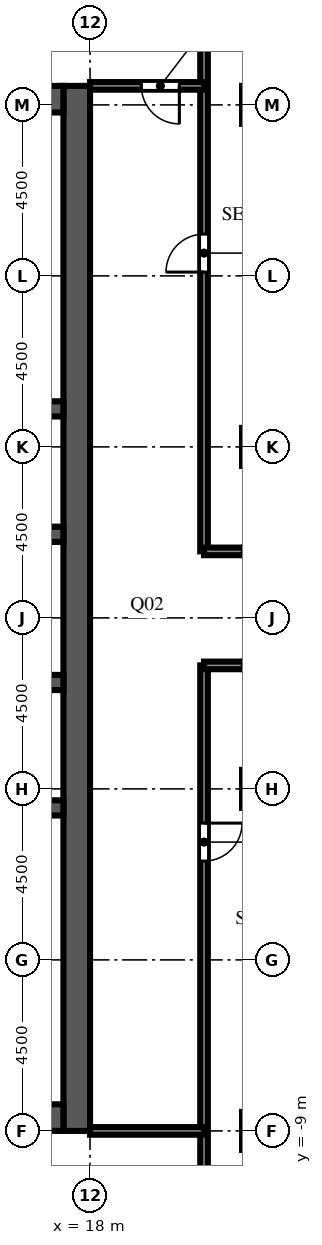
"""IFC4 building model, lengths in metres.
Left out: names, types, materials, properties, quantities, classifications, styles, units other than length and angle.
Written with IfcOpenShell. Run it as: python <this file> out.ifc"""

import sys

from ifc_helpers import new_model, si_unit, direction, frame, frame_2d, origin, place, context, subcontext, project, spatial, rectangle, extrude, element, fill, save


model = new_model("IFC4")
c1 = context("Model", 3, precision=1e-05, world=origin(), true_north=direction((0.0, 1.0)))
c2 = subcontext(c1, "Body", "Model", "MODEL_VIEW")
j1 = project(units=[si_unit("LENGTHUNIT", "METRE"), si_unit("PLANEANGLEUNIT", "RADIAN")], contexts=[c1])
p1 = place(None, origin())
s1 = spatial("IfcSite", under=j1, at=p1, CompositionType="ELEMENT")
p2 = place(p1, origin())
s2 = spatial("IfcBuilding", under=s1, at=p2, CompositionType="ELEMENT")
p3 = place(p2, frame((0.0, 0.0, 260.3)))
s3 = spatial("IfcBuildingStorey", under=s2, at=p3, CompositionType="ELEMENT", Elevation=260.3)
p4 = place(p3, frame((17.65, -9.0, 0.0), z_axis=(0.0, 0.0, 1.0), x_axis=(0.0, 1.0, 0.0)))
e1 = element("IfcWall", 1, at=p4, inside=s3, PredefinedType="SHEAR", context=c2, shape_type="SweptSolid", body=[
    extrude(rectangle(XDim=27.5, YDim=0.7, at=frame_2d((13.75, 0.0))), origin(), (0.0, 0.0, 1.0), 6.0),
])
p5 = place(p4, frame((12.55, 0.0, 0.0)))
e2 = element("IfcOpeningElement", 2, at=p5, cuts=e1, PredefinedType="OPENING", context=c2, shape_type="SweptSolid", body=[
    extrude(rectangle(XDim=2.4, YDim=2.4, at=frame_2d((1.2, 1.2))), frame((0.0, 0.36, 0.0), z_axis=(0.0, -1.0, 0.0), x_axis=(1.0, 0.0, 0.0)), (0.0, 0.0, 1.0), 0.72),
])
p6 = place(p4, frame((6.825, 0.0, 0.0)))
e3 = element("IfcOpeningElement", 3, at=p6, cuts=e1, PredefinedType="OPENING", context=c2, shape_type="SweptSolid", body=[
    extrude(rectangle(XDim=1.2, YDim=2.1, at=frame_2d((0.6, 1.05))), frame((0.0, 0.36, 0.0), z_axis=(0.0, -1.0, 0.0), x_axis=(1.0, 0.0, 0.0)), (0.0, 0.0, 1.0), 0.72),
])
p7 = place(p4, frame((19.475, 0.0, 0.0)))
e4 = element("IfcOpeningElement", 4, at=p7, cuts=e1, PredefinedType="OPENING", context=c2, shape_type="SweptSolid", body=[
    extrude(rectangle(XDim=1.2, YDim=2.1, at=frame_2d((0.6, 1.05))), frame((0.0, 0.36, 0.0), z_axis=(0.0, -1.0, 0.0), x_axis=(1.0, 0.0, 0.0)), (0.0, 0.0, 1.0), 0.72),
])
for number, where, z_axis, x_axis in (
    (5, (6.7, -8.65, 0.0), (0.0, 0.0, 1.0), (1.0, 0.0, 0.0)),
    (6, (6.7, 18.15, 0.0), (0.0, 0.0, 1.0), (1.0, 0.0, 0.0)),
):
    element("IfcWall", number, at=place(p3, frame(where, z_axis=z_axis, x_axis=x_axis)), inside=s3, PredefinedType="SHEAR", context=c2, shape_type="SweptSolid", body=[
        extrude(rectangle(XDim=10.6, YDim=0.7, at=frame_2d((5.3, 0.0))), origin(), (0.0, 0.0, 1.0), 6.0),
    ])
p8 = place(p3, frame((6.7, -0.5, 0.0), z_axis=(0.0, 0.0, 1.0), x_axis=(1.0, 0.0, 0.0)))
e7 = element("IfcWall", 7, at=p8, inside=s3, PredefinedType="SHEAR", context=c2, shape_type="SweptSolid", body=[
    extrude(rectangle(XDim=10.6, YDim=0.4, at=frame_2d((5.3, 0.0))), origin(), (0.0, 0.0, 1.0), 6.0),
])
p9 = place(p3, frame((6.7, 2.8, 0.0), z_axis=(0.0, 0.0, 1.0), x_axis=(1.0, 0.0, 0.0)))
e8 = element("IfcWall", 8, at=p9, inside=s3, PredefinedType="SHEAR", context=c2, shape_type="SweptSolid", body=[
    extrude(rectangle(XDim=10.6, YDim=0.4, at=frame_2d((5.3, 0.0))), origin(), (0.0, 0.0, 1.0), 6.0),
])
p10 = place(p9, frame((0.688, 0.0, 0.0)))
e9 = element("IfcOpeningElement", 9, at=p10, cuts=e8, PredefinedType="OPENING", context=c2, shape_type="SweptSolid", body=[
    extrude(rectangle(XDim=1.1, YDim=2.1, at=frame_2d((0.55, 1.05))), frame((0.0, 0.21, 0.0), z_axis=(0.0, -1.0, 0.0), x_axis=(1.0, 0.0, 0.0)), (0.0, 0.0, 1.0), 0.42),
])
p11 = place(p9, frame((3.438, 0.0, 0.0)))
e10 = element("IfcOpeningElement", 10, at=p11, cuts=e8, PredefinedType="OPENING", context=c2, shape_type="SweptSolid", body=[
    extrude(rectangle(XDim=1.1, YDim=2.1, at=frame_2d((0.55, 1.05))), frame((0.0, 0.21, 0.0), z_axis=(0.0, -1.0, 0.0), x_axis=(1.0, 0.0, 0.0)), (0.0, 0.0, 1.0), 0.42),
])
p12 = place(p9, frame((6.113, 0.0, 0.0)))
e11 = element("IfcOpeningElement", 11, at=p12, cuts=e8, PredefinedType="OPENING", context=c2, shape_type="SweptSolid", body=[
    extrude(rectangle(XDim=1.0, YDim=2.1, at=frame_2d((0.5, 1.05))), frame((0.0, 0.21, 0.0), z_axis=(0.0, -1.0, 0.0), x_axis=(1.0, 0.0, 0.0)), (0.0, 0.0, 1.0), 0.42),
])
p13 = place(p9, frame((8.863, 0.0, 0.0)))
e12 = element("IfcOpeningElement", 12, at=p13, cuts=e8, PredefinedType="OPENING", context=c2, shape_type="SweptSolid", body=[
    extrude(rectangle(XDim=1.0, YDim=2.1, at=frame_2d((0.5, 1.05))), frame((0.0, 0.21, 0.0), z_axis=(0.0, -1.0, 0.0), x_axis=(1.0, 0.0, 0.0)), (0.0, 0.0, 1.0), 0.42),
])
p14 = place(p3, frame((6.7, 6.7, 0.0), z_axis=(0.0, 0.0, 1.0), x_axis=(1.0, 0.0, 0.0)))
e13 = element("IfcWall", 13, at=p14, inside=s3, PredefinedType="SHEAR", context=c2, shape_type="SweptSolid", body=[
    extrude(rectangle(XDim=10.6, YDim=0.4, at=frame_2d((5.3, 0.0))), origin(), (0.0, 0.0, 1.0), 6.0),
])
p15 = place(p14, frame((3.438, 0.0, 0.0)))
e14 = element("IfcOpeningElement", 14, at=p15, cuts=e13, PredefinedType="OPENING", context=c2, shape_type="SweptSolid", body=[
    extrude(rectangle(XDim=1.1, YDim=2.1, at=frame_2d((0.55, 1.05))), frame((0.0, 0.21, 0.0), z_axis=(0.0, -1.0, 0.0), x_axis=(1.0, 0.0, 0.0)), (0.0, 0.0, 1.0), 0.42),
])
p16 = place(p14, frame((6.062, 0.0, 0.0)))
e15 = element("IfcOpeningElement", 15, at=p16, cuts=e13, PredefinedType="OPENING", context=c2, shape_type="SweptSolid", body=[
    extrude(rectangle(XDim=1.1, YDim=2.1, at=frame_2d((0.55, 1.05))), frame((0.0, 0.21, 0.0), z_axis=(0.0, -1.0, 0.0), x_axis=(1.0, 0.0, 0.0)), (0.0, 0.0, 1.0), 0.42),
])
p17 = place(p14, frame((8.812, 0.0, 0.0)))
e16 = element("IfcOpeningElement", 16, at=p17, cuts=e13, PredefinedType="OPENING", context=c2, shape_type="SweptSolid", body=[
    extrude(rectangle(XDim=1.1, YDim=2.1, at=frame_2d((0.55, 1.05))), frame((0.0, 0.21, 0.0), z_axis=(0.0, -1.0, 0.0), x_axis=(1.0, 0.0, 0.0)), (0.0, 0.0, 1.0), 0.42),
])
p18 = place(p14, frame((0.738, 0.0, 0.0)))
e17 = element("IfcOpeningElement", 17, at=p18, cuts=e13, PredefinedType="OPENING", context=c2, shape_type="SweptSolid", body=[
    extrude(rectangle(XDim=1.0, YDim=2.1, at=frame_2d((0.5, 1.05))), frame((0.0, 0.21, 0.0), z_axis=(0.0, -1.0, 0.0), x_axis=(1.0, 0.0, 0.0)), (0.0, 0.0, 1.0), 0.42),
])
p19 = place(p3, frame((6.7, 10.0, 0.0), z_axis=(0.0, 0.0, 1.0), x_axis=(1.0, 0.0, 0.0)))
e18 = element("IfcWall", 18, at=p19, inside=s3, PredefinedType="SHEAR", context=c2, shape_type="SweptSolid", body=[
    extrude(rectangle(XDim=10.6, YDim=0.4, at=frame_2d((5.3, 0.0))), origin(), (0.0, 0.0, 1.0), 6.0),
])
p20 = place(p3, frame((21.0, 3.25, 0.0), z_axis=(0.0, 0.0, 1.0), x_axis=(0.0, -1.0, 0.0)))
e19 = element("IfcWall", 19, at=p20, inside=s3, PredefinedType="PARTITIONING", context=c2, shape_type="SweptSolid", body=[
    extrude(rectangle(XDim=20.8, YDim=0.2, at=frame_2d((10.4, 0.0))), origin(), (0.0, 0.0, 1.0), 5.55),
])
p21 = place(p20, frame((4.15, 0.0, 0.0)))
e20 = element("IfcOpeningElement", 20, at=p21, cuts=e19, PredefinedType="OPENING", context=c2, shape_type="SweptSolid", body=[
    extrude(rectangle(XDim=1.0, YDim=2.1, at=frame_2d((0.5, 1.05))), frame((0.0, 0.11, 0.0), z_axis=(0.0, -1.0, 0.0), x_axis=(1.0, 0.0, 0.0)), (0.0, 0.0, 1.0), 0.22),
])
p22 = place(p3, frame((21.0, 31.4, 0.0), z_axis=(0.0, 0.0, 1.0), x_axis=(0.0, -1.0, 0.0)))
e21 = element("IfcWall", 21, at=p22, inside=s3, PredefinedType="PARTITIONING", context=c2, shape_type="SweptSolid", body=[
    extrude(rectangle(XDim=25.15, YDim=0.2, at=frame_2d((12.575, 0.0))), origin(), (0.0, 0.0, 1.0), 5.55),
])
p23 = place(p22, frame((16.8, 0.0, 0.0)))
e22 = element("IfcOpeningElement", 22, at=p23, cuts=e21, PredefinedType="OPENING", context=c2, shape_type="SweptSolid", body=[
    extrude(rectangle(XDim=1.0, YDim=2.1, at=frame_2d((0.5, 1.05))), frame((0.0, 0.11, 0.0), z_axis=(0.0, -1.0, 0.0), x_axis=(1.0, 0.0, 0.0)), (0.0, 0.0, 1.0), 0.22),
])
p24 = place(p3, frame((18.0, -9.0, 0.0), z_axis=(0.0, 0.0, 1.0), x_axis=(1.0, 0.0, 0.0)))
e23 = element("IfcWall", 23, at=p24, inside=s3, PredefinedType="PARTITIONING", context=c2, shape_type="SweptSolid", body=[
    extrude(rectangle(XDim=3.0, YDim=0.2, at=frame_2d((1.5, 0.0))), origin(), (0.0, 0.0, 1.0), 5.55),
])
for number, where, z_axis, x_axis in (
    (24, (21.0, 3.25, 0.0), (0.0, 0.0, 1.0), (1.0, 0.0, 0.0)),
    (25, (21.0, 6.25, 0.0), (0.0, 0.0, 1.0), (1.0, 0.0, 0.0)),
):
    element("IfcWall", number, at=place(p3, frame(where, z_axis=z_axis, x_axis=x_axis)), inside=s3, PredefinedType="PARTITIONING", context=c2, shape_type="SweptSolid", body=[
        extrude(rectangle(XDim=1.05, YDim=0.2, at=frame_2d((0.525, 0.0))), origin(), (0.0, 0.0, 1.0), 5.55),
    ])
p25 = place(p3, frame((18.0, 18.5, 0.0), z_axis=(0.0, 0.0, 1.0), x_axis=(1.0, 0.0, 0.0)))
e26 = element("IfcWall", 26, at=p25, inside=s3, PredefinedType="PARTITIONING", context=c2, shape_type="SweptSolid", body=[
    extrude(rectangle(XDim=3.0, YDim=0.2, at=frame_2d((1.5, 0.0))), origin(), (0.0, 0.0, 1.0), 5.55),
])
p26 = place(p25, frame((1.35, 0.0, 0.0)))
e27 = element("IfcOpeningElement", 27, at=p26, cuts=e26, PredefinedType="OPENING", context=c2, shape_type="SweptSolid", body=[
    extrude(rectangle(XDim=1.0, YDim=2.1, at=frame_2d((0.5, 1.05))), frame((0.0, 0.11, 0.0), z_axis=(0.0, -1.0, 0.0), x_axis=(1.0, 0.0, 0.0)), (0.0, 0.0, 1.0), 0.22),
])
p27 = place(p5, origin())
e28 = element("IfcDoor", 28, at=p27, inside=s3, OperationType="DOUBLE_DOOR_DOUBLE_SWING", PredefinedType="DOOR", context=c2, shape_type="SweptSolid", body=[
    extrude(rectangle(XDim=2.4, YDim=2.4, at=frame_2d((1.2, 1.2))), frame((0.0, 0.025, 0.0), z_axis=(0.0, -1.0, 0.0), x_axis=(1.0, 0.0, 0.0)), (0.0, 0.0, 1.0), 0.05),
])
fill(e2, e28)
p28 = place(p6, frame((1.2, 0.0, 0.0), z_axis=(0.0, 0.0, 1.0), x_axis=(-1.0, 0.0, 0.0)))
e29 = element("IfcDoor", 29, at=p28, inside=s3, OperationType="SINGLE_SWING_LEFT", PredefinedType="DOOR", context=c2, shape_type="SweptSolid", body=[
    extrude(rectangle(XDim=1.2, YDim=2.1, at=frame_2d((0.6, 1.05))), frame((0.0, 0.025, 0.0), z_axis=(0.0, -1.0, 0.0), x_axis=(1.0, 0.0, 0.0)), (0.0, 0.0, 1.0), 0.05),
])
fill(e3, e29)
p29 = place(p7, frame((1.2, 0.0, 0.0), z_axis=(0.0, 0.0, 1.0), x_axis=(-1.0, 0.0, 0.0)))
e30 = element("IfcDoor", 30, at=p29, inside=s3, OperationType="SINGLE_SWING_LEFT", PredefinedType="DOOR", context=c2, shape_type="SweptSolid", body=[
    extrude(rectangle(XDim=1.2, YDim=2.1, at=frame_2d((0.6, 1.05))), frame((0.0, 0.025, 0.0), z_axis=(0.0, -1.0, 0.0), x_axis=(1.0, 0.0, 0.0)), (0.0, 0.0, 1.0), 0.05),
])
fill(e4, e30)
p30 = place(p26, origin())
e31 = element("IfcDoor", 31, at=p30, inside=s3, OperationType="SINGLE_SWING_RIGHT", PredefinedType="DOOR", context=c2, shape_type="SweptSolid", body=[
    extrude(rectangle(XDim=1.0, YDim=2.1, at=frame_2d((0.5, 1.05))), frame((0.0, 0.025, 0.0), z_axis=(0.0, -1.0, 0.0), x_axis=(1.0, 0.0, 0.0)), (0.0, 0.0, 1.0), 0.05),
])
fill(e27, e31)
p31 = place(p21, origin())
e32 = element("IfcDoor", 32, at=p31, inside=s3, OperationType="SINGLE_SWING_LEFT", PredefinedType="DOOR", context=c2, shape_type="SweptSolid", body=[
    extrude(rectangle(XDim=1.0, YDim=2.1, at=frame_2d((0.5, 1.05))), frame((0.0, 0.025, 0.0), z_axis=(0.0, -1.0, 0.0), x_axis=(1.0, 0.0, 0.0)), (0.0, 0.0, 1.0), 0.05),
])
fill(e20, e32)
p32 = place(p23, origin())
e33 = element("IfcDoor", 33, at=p32, inside=s3, OperationType="SINGLE_SWING_RIGHT", PredefinedType="DOOR", context=c2, shape_type="SweptSolid", body=[
    extrude(rectangle(XDim=1.0, YDim=2.1, at=frame_2d((0.5, 1.05))), frame((0.0, 0.025, 0.0), z_axis=(0.0, -1.0, 0.0), x_axis=(1.0, 0.0, 0.0)), (0.0, 0.0, 1.0), 0.05),
])
fill(e22, e33)
save(model, sys.argv[1])
